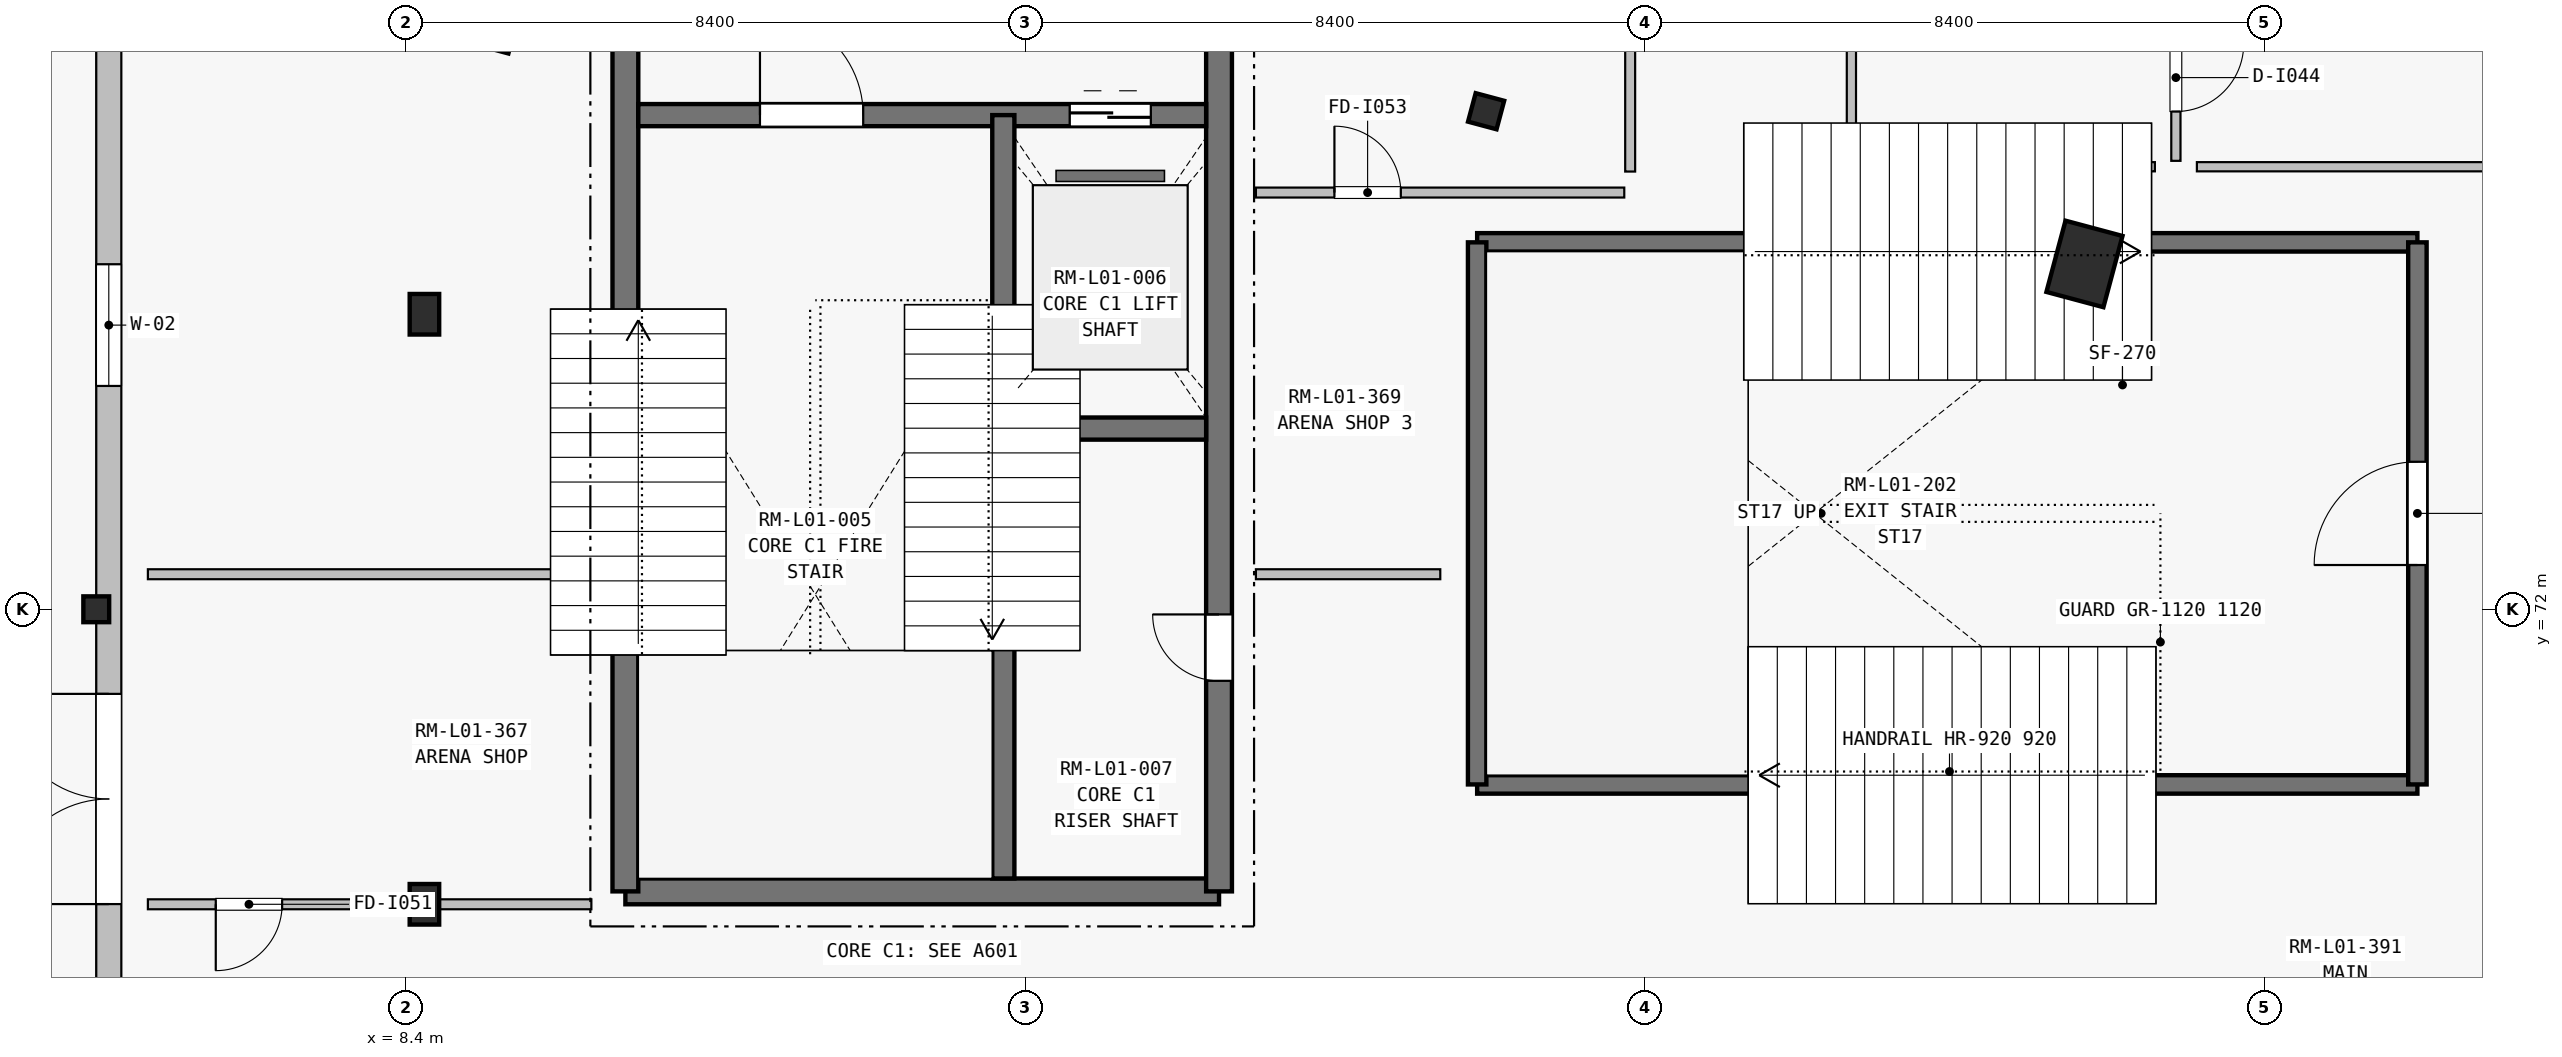
"""IFC4 building model, lengths in metres.
Left out: names, types, materials, properties, quantities, classifications, styles, units other than length and angle.
Written with IfcOpenShell. Run it as: python <this file> out.ifc"""

import sys

from ifc_helpers import new_model, si_unit, direction, frame, frame_2d, origin, origin_2d, place, context, subcontext, project, spatial, rectangle, i_section, extrude, element, fill, save


model = new_model("IFC4")
c1 = context("Model", 3, precision=1e-05, world=origin(), true_north=direction((0.0, 1.0)))
c2 = subcontext(c1, "Body", "Model", "MODEL_VIEW")
j1 = project(units=[si_unit("LENGTHUNIT", "METRE"), si_unit("PLANEANGLEUNIT", "RADIAN")], contexts=[c1])
p1 = place(None, origin())
s1 = spatial("IfcSite", under=j1, at=p1, CompositionType="ELEMENT")
p2 = place(p1, origin())
s2 = spatial("IfcBuilding", under=s1, at=p2, CompositionType="ELEMENT")
p3 = place(p2, frame((0.0, 0.0, 5.4)))
s3 = spatial("IfcBuildingStorey", under=s2, at=p3, CompositionType="ELEMENT", Elevation=5.4)
p4 = place(p3, frame((31.16, 76.682, 0.0), z_axis=(0.0, 0.0, 1.0), x_axis=(-0.965925826289, 0.258819045103, 0.0)))
e1 = element("IfcColumn", 1, at=p4, inside=s3, PredefinedType="COLUMN", context=c2, shape_type="SweptSolid", body=[
    extrude(rectangle(XDim=0.8, YDim=1.0, at=origin_2d()), origin(), (0.0, 0.0, 1.0), 4.5),
])
p5 = place(p3, frame((23.046, 78.753, 0.0), z_axis=(0.0, 0.0, 1.0), x_axis=(-0.965925826289, 0.258819045103, 0.0)))
e2 = element("IfcColumn", 2, at=p5, inside=s3, PredefinedType="COLUMN", context=c2, shape_type="SweptSolid", body=[
    extrude(i_section(OverallWidth=0.4, OverallDepth=0.4, WebThickness=0.018, FlangeThickness=0.032, at=origin_2d()), origin(), (0.0, 0.0, 1.0), 4.5),
])
p6 = place(p3, frame((9.524, 79.995, 0.0), z_axis=(0.0, 0.0, 1.0), x_axis=(-0.965925826289, 0.258819045103, 0.0)))
e3 = element("IfcColumn", 3, at=p6, inside=s3, PredefinedType="COLUMN", context=c2, shape_type="SweptSolid", body=[
    extrude(rectangle(XDim=0.75, YDim=0.75, at=origin_2d()), origin(), (0.0, 0.0, 1.0), 4.23),
])
p7 = place(p3, frame((4.2, 72.0, 0.0), z_axis=(0.0, 0.0, 1.0), x_axis=(1.0, 0.0, 0.0)))
e4 = element("IfcColumn", 4, at=p7, inside=s3, PredefinedType="COLUMN", context=c2, shape_type="SweptSolid", body=[
    extrude(i_section(OverallWidth=0.35, OverallDepth=0.35, WebThickness=0.014, FlangeThickness=0.024, at=origin_2d()), origin(), (0.0, 0.0, 1.0), 4.15),
])
for number, where, z_axis, x_axis in (
    (5, (8.65, 68.0, 0.0), (0.0, 0.0, 1.0), (1.0, 0.0, 0.0)),
    (6, (8.65, 76.0, 0.0), (0.0, 0.0, 1.0), (1.0, 0.0, 0.0)),
):
    element("IfcColumn", number, at=place(p3, frame(where, z_axis=z_axis, x_axis=x_axis)), inside=s3, PredefinedType="PILASTER", context=c2, shape_type="SweptSolid", body=[
        extrude(rectangle(XDim=0.4, YDim=0.55, at=origin_2d()), origin(), (0.0, 0.0, 1.0), 4.5),
    ])
p8 = place(p3, frame((4.37, 35.803, 0.0), z_axis=(0.0, 0.0, 1.0), x_axis=(0.0, 1.0, 0.0)))
e7 = element("IfcWall", 7, at=p8, inside=s3, PredefinedType="SOLIDWALL", context=c2, shape_type="SweptSolid", body=[
    extrude(rectangle(XDim=56.395, YDim=0.34, at=frame_2d((28.197, 0.0))), origin(), (0.0, 0.0, 1.0), 3.673),
])
p9 = place(p8, frame((7.4, 0.0, 0.0)))
e8 = element("IfcOpeningElement", 8, at=p9, cuts=e7, PredefinedType="OPENING", context=c2, shape_type="SweptSolid", body=[
    extrude(rectangle(XDim=3.0, YDim=2.55, at=frame_2d((1.5, 1.275))), frame((0.0, 0.18, 0.0), z_axis=(0.0, -1.0, 0.0), x_axis=(1.0, 0.0, 0.0)), (0.0, 0.0, 1.0), 0.36),
])
p10 = place(p8, frame((13.6, 0.0, 0.0)))
e9 = element("IfcOpeningElement", 9, at=p10, cuts=e7, PredefinedType="OPENING", context=c2, shape_type="SweptSolid", body=[
    extrude(rectangle(XDim=2.85, YDim=2.5, at=frame_2d((1.425, 1.25))), frame((0.0, 0.18, 0.0), z_axis=(0.0, -1.0, 0.0), x_axis=(1.0, 0.0, 0.0)), (0.0, 0.0, 1.0), 0.36),
])
p11 = place(p8, frame((21.3, 0.0, 0.0)))
e10 = element("IfcOpeningElement", 10, at=p11, cuts=e7, PredefinedType="OPENING", context=c2, shape_type="SweptSolid", body=[
    extrude(rectangle(XDim=3.0, YDim=2.55, at=frame_2d((1.5, 1.275))), frame((0.0, 0.18, 0.0), z_axis=(0.0, -1.0, 0.0), x_axis=(1.0, 0.0, 0.0)), (0.0, 0.0, 1.0), 0.36),
])
p12 = place(p8, frame((32.2, 0.0, 0.0)))
e11 = element("IfcOpeningElement", 11, at=p12, cuts=e7, PredefinedType="OPENING", context=c2, shape_type="SweptSolid", body=[
    extrude(rectangle(XDim=2.85, YDim=2.5, at=frame_2d((1.425, 1.25))), frame((0.0, 0.18, 0.0), z_axis=(0.0, -1.0, 0.0), x_axis=(1.0, 0.0, 0.0)), (0.0, 0.0, 1.0), 0.36),
])
p13 = place(p8, frame((28.935, 0.0, 0.0)))
e12 = element("IfcOpeningElement", 12, at=p13, cuts=e7, PredefinedType="OPENING", context=c2, shape_type="SweptSolid", body=[
    extrude(rectangle(XDim=1.8, YDim=2.35, at=frame_2d((0.9, 1.175))), frame((0.0, 0.18, 0.0), z_axis=(0.0, -1.0, 0.0), x_axis=(1.0, 0.0, 0.0)), (0.0, 0.0, 1.0), 0.36),
])
p14 = place(p8, frame((25.825, 0.0, 0.9)))
e13 = element("IfcOpeningElement", 13, at=p14, cuts=e7, PredefinedType="OPENING", context=c2, shape_type="SweptSolid", body=[
    extrude(rectangle(XDim=0.85, YDim=2.1, at=frame_2d((0.425, 1.05))), frame((0.0, 0.18, 0.0), z_axis=(0.0, -1.0, 0.0), x_axis=(1.0, 0.0, 0.0)), (0.0, 0.0, 1.0), 0.36),
])
p15 = place(p8, frame((39.225, 0.0, 0.75)))
e14 = element("IfcOpeningElement", 14, at=p15, cuts=e7, PredefinedType="OPENING", context=c2, shape_type="SweptSolid", body=[
    extrude(rectangle(XDim=1.65, YDim=2.4, at=frame_2d((0.825, 1.2))), frame((0.0, 0.18, 0.0), z_axis=(0.0, -1.0, 0.0), x_axis=(1.0, 0.0, 0.0)), (0.0, 0.0, 1.0), 0.36),
])
p16 = place(p8, frame((48.65, 0.0, 0.75)))
e15 = element("IfcOpeningElement", 15, at=p16, cuts=e7, PredefinedType="OPENING", context=c2, shape_type="SweptSolid", body=[
    extrude(rectangle(XDim=1.2, YDim=2.2, at=frame_2d((0.6, 1.1))), frame((0.0, 0.18, 0.0), z_axis=(0.0, -1.0, 0.0), x_axis=(1.0, 0.0, 0.0)), (0.0, 0.0, 1.0), 0.36),
])
p17 = place(p3, frame((11.375, 68.175, 0.0), z_axis=(0.0, 0.0, 1.0), x_axis=(1.0, 0.0, 0.0)))
e16 = element("IfcWall", 16, at=p17, inside=s3, PredefinedType="SHEAR", context=c2, shape_type="SweptSolid", body=[
    extrude(rectangle(XDim=8.05, YDim=0.35, at=frame_2d((4.025, 0.0))), origin(), (0.0, 0.0, 1.0), 4.5),
])
p18 = place(p3, frame((11.375, 68.175, 0.0), z_axis=(0.0, 0.0, 1.0), x_axis=(0.0, 1.0, 0.0)))
e17 = element("IfcWall", 17, at=p18, inside=s3, PredefinedType="SHEAR", context=c2, shape_type="SweptSolid", body=[
    extrude(rectangle(XDim=14.85, YDim=0.35, at=frame_2d((7.425, 0.0))), origin(), (0.0, 0.0, 1.0), 4.5),
])
p19 = place(p3, frame((19.425, 68.175, 0.0), z_axis=(0.0, 0.0, 1.0), x_axis=(0.0, 1.0, 0.0)))
e18 = element("IfcWall", 18, at=p19, inside=s3, PredefinedType="SHEAR", context=c2, shape_type="SweptSolid", body=[
    extrude(rectangle(XDim=14.85, YDim=0.35, at=frame_2d((7.425, 0.0))), origin(), (0.0, 0.0, 1.0), 4.5),
])
p20 = place(p19, frame((2.855, 0.0, 0.0)))
e19 = element("IfcOpeningElement", 19, at=p20, cuts=e18, PredefinedType="OPENING", context=c2, shape_type="SweptSolid", body=[
    extrude(rectangle(XDim=0.9, YDim=2.1, at=frame_2d((0.45, 1.05))), frame((0.0, 0.185, 0.0), z_axis=(0.0, -1.0, 0.0), x_axis=(1.0, 0.0, 0.0)), (0.0, 0.0, 1.0), 0.37),
])
p21 = place(p3, frame((11.55, 78.7, 0.0), z_axis=(0.0, 0.0, 1.0), x_axis=(1.0, 0.0, 0.0)))
e20 = element("IfcWall", 20, at=p21, inside=s3, PredefinedType="SHEAR", context=c2, shape_type="SweptSolid", body=[
    extrude(rectangle(XDim=7.7, YDim=0.3, at=frame_2d((3.85, 0.0))), origin(), (0.0, 0.0, 1.0), 4.5),
])
p22 = place(p21, frame((1.65, 0.0, 0.0)))
e21 = element("IfcOpeningElement", 21, at=p22, cuts=e20, PredefinedType="OPENING", context=c2, shape_type="SweptSolid", body=[
    extrude(rectangle(XDim=1.4, YDim=2.2, at=frame_2d((0.7, 1.1))), frame((0.0, 0.16, 0.0), z_axis=(0.0, -1.0, 0.0), x_axis=(1.0, 0.0, 0.0)), (0.0, 0.0, 1.0), 0.32),
])
p23 = place(p21, frame((5.85, 0.0, 0.0)))
e22 = element("IfcOpeningElement", 22, at=p23, cuts=e20, PredefinedType="OPENING", context=c2, shape_type="SweptSolid", body=[
    extrude(rectangle(XDim=1.1, YDim=2.2, at=frame_2d((0.55, 1.1))), frame((0.0, 0.16, 0.0), z_axis=(0.0, -1.0, 0.0), x_axis=(1.0, 0.0, 0.0)), (0.0, 0.0, 1.0), 0.32),
])
p24 = place(p3, frame((16.5, 68.35, 0.0), z_axis=(0.0, 0.0, 1.0), x_axis=(0.0, 1.0, 0.0)))
e23 = element("IfcWall", 23, at=p24, inside=s3, PredefinedType="SHEAR", context=c2, shape_type="SweptSolid", body=[
    extrude(rectangle(XDim=10.35, YDim=0.3, at=frame_2d((5.175, 0.0))), origin(), (0.0, 0.0, 1.0), 4.5),
])
p25 = place(p3, frame((16.65, 74.45, 0.0), z_axis=(0.0, 0.0, 1.0), x_axis=(1.0, 0.0, 0.0)))
e24 = element("IfcWall", 24, at=p25, inside=s3, PredefinedType="SHEAR", context=c2, shape_type="SweptSolid", body=[
    extrude(rectangle(XDim=2.6, YDim=0.3, at=frame_2d((1.3, 0.0))), origin(), (0.0, 0.0, 1.0), 4.5),
])
for number, where, z_axis, x_axis in (
    (25, (22.925, 69.625, 0.0), (0.0, 0.0, 1.0), (1.0, 0.0, 0.0)),
    (26, (22.925, 76.975, 0.0), (0.0, 0.0, 1.0), (1.0, 0.0, 0.0)),
):
    element("IfcWall", number, at=place(p3, frame(where, z_axis=z_axis, x_axis=x_axis)), inside=s3, PredefinedType="SHEAR", context=c2, shape_type="SweptSolid", body=[
        extrude(rectangle(XDim=12.75, YDim=0.25, at=frame_2d((6.375, 0.0))), origin(), (0.0, 0.0, 1.0), 4.5),
    ])
p26 = place(p3, frame((22.925, 69.625, 0.0), z_axis=(0.0, 0.0, 1.0), x_axis=(0.0, 1.0, 0.0)))
e27 = element("IfcWall", 27, at=p26, inside=s3, PredefinedType="SHEAR", context=c2, shape_type="SweptSolid", body=[
    extrude(rectangle(XDim=7.35, YDim=0.25, at=frame_2d((3.675, 0.0))), origin(), (0.0, 0.0, 1.0), 4.5),
])
p27 = place(p3, frame((35.675, 69.625, 0.0), z_axis=(0.0, 0.0, 1.0), x_axis=(0.0, 1.0, 0.0)))
e28 = element("IfcWall", 28, at=p27, inside=s3, PredefinedType="SHEAR", context=c2, shape_type="SweptSolid", body=[
    extrude(rectangle(XDim=7.35, YDim=0.25, at=frame_2d((3.675, 0.0))), origin(), (0.0, 0.0, 1.0), 4.5),
])
p28 = place(p27, frame((2.975, 0.0, 0.0)))
e29 = element("IfcOpeningElement", 29, at=p28, cuts=e28, PredefinedType="OPENING", context=c2, shape_type="SweptSolid", body=[
    extrude(rectangle(XDim=1.4, YDim=2.2, at=frame_2d((0.7, 1.1))), frame((0.0, 0.135, 0.0), z_axis=(0.0, -1.0, 0.0), x_axis=(1.0, 0.0, 0.0)), (0.0, 0.0, 1.0), 0.27),
])
p29 = place(p3, frame((32.4, 82.715, 0.0), z_axis=(0.0, 0.0, 1.0), x_axis=(0.0, -1.0, 0.0)))
e30 = element("IfcWall", 30, at=p29, inside=s3, PredefinedType="PARTITIONING", context=c2, shape_type="SweptSolid", body=[
    extrude(rectangle(XDim=4.635, YDim=0.125, at=frame_2d((2.317, 0.0))), origin(), (0.0, 0.0, 1.0), 4.23),
])
p30 = place(p29, frame((3.046, 0.0, 0.0)))
e31 = element("IfcOpeningElement", 31, at=p30, cuts=e30, PredefinedType="OPENING", context=c2, shape_type="SweptSolid", body=[
    extrude(rectangle(XDim=0.92, YDim=2.1, at=frame_2d((0.46, 1.05))), frame((0.0, 0.073, 0.0), z_axis=(0.0, -1.0, 0.0), x_axis=(1.0, 0.0, 0.0)), (0.0, 0.0, 1.0), 0.145),
])
p31 = place(p3, frame((32.115, 78.0, 0.0), z_axis=(0.0, 0.0, 1.0), x_axis=(-1.0, 0.0, 0.0)))
e32 = element("IfcWall", 32, at=p31, inside=s3, PredefinedType="PARTITIONING", context=c2, shape_type="SweptSolid", body=[
    extrude(rectangle(XDim=4.035, YDim=0.125, at=frame_2d((2.018, 0.0))), origin(), (0.0, 0.0, 1.0), 4.23),
])
p32 = place(p3, frame((28.0, 78.285, 0.0), z_axis=(0.0, 0.0, 1.0), x_axis=(0.0, 1.0, 0.0)))
e33 = element("IfcWall", 33, at=p32, inside=s3, PredefinedType="PARTITIONING", context=c2, shape_type="SweptSolid", body=[
    extrude(rectangle(XDim=4.43, YDim=0.125, at=frame_2d((2.215, 0.0))), origin(), (0.0, 0.0, 1.0), 4.23),
])
p33 = place(p32, frame((1.74, 0.0, 0.0)))
e34 = element("IfcOpeningElement", 34, at=p33, cuts=e33, PredefinedType="OPENING", context=c2, shape_type="SweptSolid", body=[
    extrude(rectangle(XDim=0.95, YDim=2.1, at=frame_2d((0.475, 1.05))), frame((0.0, 0.073, 0.0), z_axis=(0.0, -1.0, 0.0), x_axis=(1.0, 0.0, 0.0)), (0.0, 0.0, 1.0), 0.145),
])
p34 = place(p3, frame((36.72, 78.0, 0.0), z_axis=(0.0, 0.0, 1.0), x_axis=(-1.0, 0.0, 0.0)))
e35 = element("IfcWall", 35, at=p34, inside=s3, PredefinedType="PARTITIONING", context=c2, shape_type="SweptSolid", body=[
    extrude(rectangle(XDim=4.035, YDim=0.125, at=frame_2d((2.018, 0.0))), origin(), (0.0, 0.0, 1.0), 4.23),
])
p35 = place(p3, frame((10.914, 68.0, 0.0), z_axis=(0.0, 0.0, 1.0), x_axis=(-1.0, 0.0, 0.0)))
e36 = element("IfcWall", 36, at=p35, inside=s3, PredefinedType="PARTITIONING", context=c2, shape_type="SweptSolid", body=[
    extrude(rectangle(XDim=6.014, YDim=0.135, at=frame_2d((3.007, 0.0))), origin(), (0.0, 0.0, 1.0), 4.25),
])
p36 = place(p35, frame((4.193, 0.0, 0.0)))
e37 = element("IfcOpeningElement", 37, at=p36, cuts=e36, PredefinedType="OPENING", context=c2, shape_type="SweptSolid", body=[
    extrude(rectangle(XDim=0.9, YDim=2.1, at=frame_2d((0.45, 1.05))), frame((0.0, 0.077, 0.0), z_axis=(0.0, -1.0, 0.0), x_axis=(1.0, 0.0, 0.0)), (0.0, 0.0, 1.0), 0.155),
])
p37 = place(p3, frame((4.9, 72.475, 0.0), z_axis=(0.0, 0.0, 1.0), x_axis=(1.0, 0.0, 0.0)))
e38 = element("IfcWall", 38, at=p37, inside=s3, PredefinedType="PARTITIONING", context=c2, shape_type="SweptSolid", body=[
    extrude(rectangle(XDim=5.975, YDim=0.135, at=frame_2d((2.988, 0.0))), origin(), (0.0, 0.0, 1.0), 4.25),
])
p38 = place(p3, frame((19.925, 72.475, 0.0), z_axis=(0.0, 0.0, 1.0), x_axis=(1.0, 0.0, 0.0)))
e39 = element("IfcWall", 39, at=p38, inside=s3, PredefinedType="PARTITIONING", context=c2, shape_type="SweptSolid", body=[
    extrude(rectangle(XDim=2.5, YDim=0.135, at=frame_2d((1.25, 0.0))), origin(), (0.0, 0.0, 1.0), 3.505),
])
p39 = place(p3, frame((19.925, 77.65, 0.0), z_axis=(0.0, 0.0, 1.0), x_axis=(1.0, 0.0, 0.0)))
e40 = element("IfcWall", 40, at=p39, inside=s3, PredefinedType="PARTITIONING", context=c2, shape_type="SweptSolid", body=[
    extrude(rectangle(XDim=4.995, YDim=0.135, at=frame_2d((2.498, 0.0))), origin(), (0.0, 0.0, 1.0), 3.505),
])
p40 = place(p39, frame((1.065, 0.0, 0.0)))
e41 = element("IfcOpeningElement", 41, at=p40, cuts=e40, PredefinedType="OPENING", context=c2, shape_type="SweptSolid", body=[
    extrude(rectangle(XDim=0.9, YDim=2.1, at=frame_2d((0.45, 1.05))), frame((0.0, 0.077, 0.0), z_axis=(0.0, -1.0, 0.0), x_axis=(1.0, 0.0, 0.0)), (0.0, 0.0, 1.0), 0.155),
])
p41 = place(p3, frame((25.0, 90.915, 0.0), z_axis=(0.0, 0.0, 1.0), x_axis=(0.0, -1.0, 0.0)))
e42 = element("IfcWall", 42, at=p41, inside=s3, PredefinedType="PARTITIONING", context=c2, shape_type="SweptSolid", body=[
    extrude(rectangle(XDim=12.98, YDim=0.135, at=frame_2d((6.49, 0.0))), origin(), (0.0, 0.0, 1.0), 3.505),
])
p42 = place(p41, frame((5.515, 0.0, 0.0)))
e43 = element("IfcOpeningElement", 43, at=p42, cuts=e42, PredefinedType="OPENING", context=c2, shape_type="SweptSolid", body=[
    extrude(rectangle(XDim=1.95, YDim=2.4, at=frame_2d((0.975, 1.2))), frame((0.0, 0.077, 0.0), z_axis=(0.0, -1.0, 0.0), x_axis=(1.0, 0.0, 0.0)), (0.0, 0.0, 1.0), 0.155),
])
p43 = place(p12, origin())
e44 = element("IfcDoor", 44, at=p43, inside=s3, OperationType="DOUBLE_DOOR_SINGLE_SWING", PredefinedType="DOOR", context=c2, shape_type="SweptSolid", body=[
    extrude(rectangle(XDim=2.85, YDim=2.5, at=frame_2d((1.425, 1.25))), frame((0.0, 0.025, 0.0), z_axis=(0.0, -1.0, 0.0), x_axis=(1.0, 0.0, 0.0)), (0.0, 0.0, 1.0), 0.05),
])
fill(e11, e44)
p44 = place(p15, origin())
e45 = element("IfcWindow", 45, at=p44, inside=s3, PartitioningType="SINGLE_PANEL", PredefinedType="WINDOW", context=c2, shape_type="SweptSolid", body=[
    extrude(rectangle(XDim=1.65, YDim=2.4, at=frame_2d((0.825, 1.2))), frame((0.0, 0.03, 0.0), z_axis=(0.0, -1.0, 0.0), x_axis=(1.0, 0.0, 0.0)), (0.0, 0.0, 1.0), 0.06),
])
fill(e14, e45)
p45 = place(p22, origin())
e46 = element("IfcDoor", 46, at=p45, inside=s3, OperationType="SINGLE_SWING_LEFT", PredefinedType="DOOR", context=c2, shape_type="SweptSolid", body=[
    extrude(rectangle(XDim=1.4, YDim=2.2, at=frame_2d((0.7, 1.1))), frame((0.0, 0.025, 0.0), z_axis=(0.0, -1.0, 0.0), x_axis=(1.0, 0.0, 0.0)), (0.0, 0.0, 1.0), 0.05),
])
fill(e21, e46)
p46 = place(p20, origin())
e47 = element("IfcDoor", 47, at=p46, inside=s3, OperationType="SINGLE_SWING_RIGHT", PredefinedType="DOOR", context=c2, shape_type="SweptSolid", body=[
    extrude(rectangle(XDim=0.9, YDim=2.1, at=frame_2d((0.45, 1.05))), frame((0.0, 0.025, 0.0), z_axis=(0.0, -1.0, 0.0), x_axis=(1.0, 0.0, 0.0)), (0.0, 0.0, 1.0), 0.05),
])
fill(e19, e47)
p47 = place(p23, origin())
e48 = element("IfcDoor", 48, at=p47, inside=s3, OperationType="SLIDING_TO_LEFT", PredefinedType="DOOR", context=c2, shape_type="SweptSolid", body=[
    extrude(rectangle(XDim=1.1, YDim=2.2, at=frame_2d((0.55, 1.1))), frame((0.0, 0.025, 0.0), z_axis=(0.0, -1.0, 0.0), x_axis=(1.0, 0.0, 0.0)), (0.0, 0.0, 1.0), 0.05),
])
fill(e22, e48)
p48 = place(p28, origin())
e49 = element("IfcDoor", 49, at=p48, inside=s3, OperationType="SINGLE_SWING_LEFT", PredefinedType="DOOR", context=c2, shape_type="SweptSolid", body=[
    extrude(rectangle(XDim=1.4, YDim=2.2, at=frame_2d((0.7, 1.1))), frame((0.0, 0.025, 0.0), z_axis=(0.0, -1.0, 0.0), x_axis=(1.0, 0.0, 0.0)), (0.0, 0.0, 1.0), 0.05),
])
fill(e29, e49)
p49 = place(p30, origin())
e50 = element("IfcDoor", 50, at=p49, inside=s3, OperationType="SINGLE_SWING_LEFT", PredefinedType="DOOR", context=c2, shape_type="SweptSolid", body=[
    extrude(rectangle(XDim=0.92, YDim=2.1, at=frame_2d((0.46, 1.05))), frame((0.0, 0.025, 0.0), z_axis=(0.0, -1.0, 0.0), x_axis=(1.0, 0.0, 0.0)), (0.0, 0.0, 1.0), 0.05),
])
fill(e31, e50)
p50 = place(p36, origin())
e51 = element("IfcDoor", 51, at=p50, inside=s3, OperationType="SINGLE_SWING_RIGHT", PredefinedType="DOOR", context=c2, shape_type="SweptSolid", body=[
    extrude(rectangle(XDim=0.9, YDim=2.1, at=frame_2d((0.45, 1.05))), frame((0.0, 0.025, 0.0), z_axis=(0.0, -1.0, 0.0), x_axis=(1.0, 0.0, 0.0)), (0.0, 0.0, 1.0), 0.05),
])
fill(e37, e51)
p51 = place(p40, origin())
e52 = element("IfcDoor", 52, at=p51, inside=s3, OperationType="SINGLE_SWING_LEFT", PredefinedType="DOOR", context=c2, shape_type="SweptSolid", body=[
    extrude(rectangle(XDim=0.9, YDim=2.1, at=frame_2d((0.45, 1.05))), frame((0.0, 0.025, 0.0), z_axis=(0.0, -1.0, 0.0), x_axis=(1.0, 0.0, 0.0)), (0.0, 0.0, 1.0), 0.05),
])
fill(e41, e52)
save(model, sys.argv[1])
